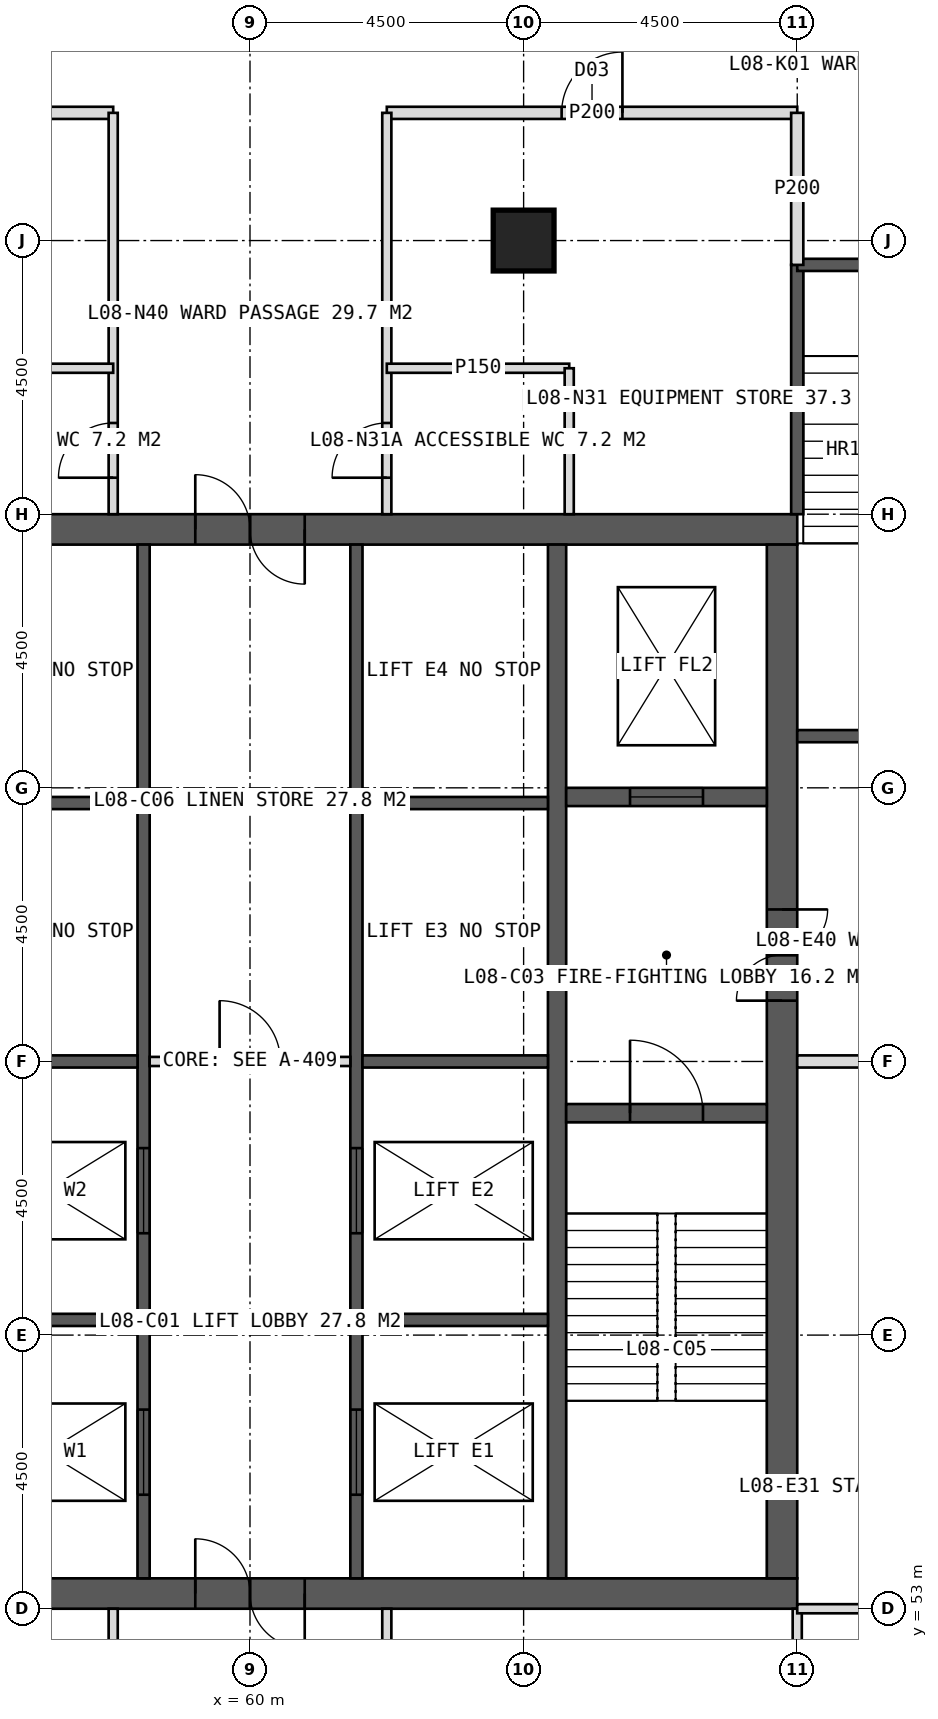
"""IFC4 building model, lengths in metres.
Left out: names, types, materials, properties, quantities, classifications, styles, units other than length and angle.
Written with IfcOpenShell. Run it as: python <this file> out.ifc"""

import sys

from ifc_helpers import new_model, si_unit, direction, frame, frame_2d, origin, origin_2d, place, context, subcontext, project, spatial, rectangle, hollow_rectangle, extrude, element, fill, save


model = new_model("IFC4")
c1 = context("Model", 3, precision=1e-05, world=origin(), true_north=direction((0.0, 1.0)))
c2 = subcontext(c1, "Body", "Model", "MODEL_VIEW")
j1 = project(units=[si_unit("LENGTHUNIT", "METRE"), si_unit("PLANEANGLEUNIT", "RADIAN")], contexts=[c1])
p1 = place(None, origin())
s1 = spatial("IfcSite", under=j1, at=p1, CompositionType="ELEMENT")
p2 = place(p1, origin())
s2 = spatial("IfcBuilding", under=s1, at=p2, CompositionType="ELEMENT")
p3 = place(p2, frame((0.0, 0.0, 39.0)))
s3 = spatial("IfcBuildingStorey", under=s2, at=p3, CompositionType="ELEMENT", Elevation=39.0)
p4 = place(p3, frame((51.0, 70.75, 0.0), z_axis=(0.0, 0.0, 1.0), x_axis=(1.0, 0.0, 0.0)))
e1 = element("IfcWall", 1, at=p4, inside=s3, PredefinedType="SHEAR", context=c2, shape_type="SweptSolid", body=[
    extrude(rectangle(XDim=18.0, YDim=0.5, at=frame_2d((9.0, 0.0))), origin(), (0.0, 0.0, 1.0), 4.0),
])
p5 = place(p4, frame((8.1, 0.0, 0.0)))
e2 = element("IfcOpeningElement", 2, at=p5, cuts=e1, PredefinedType="OPENING", context=c2, shape_type="SweptSolid", body=[
    extrude(rectangle(XDim=1.8, YDim=2.2, at=frame_2d((0.9, 1.1))), frame((0.0, 0.26, 0.0), z_axis=(0.0, -1.0, 0.0), x_axis=(1.0, 0.0, 0.0)), (0.0, 0.0, 1.0), 0.52),
])
p6 = place(p3, frame((51.0, 53.25, 0.0), z_axis=(0.0, 0.0, 1.0), x_axis=(1.0, 0.0, 0.0)))
e3 = element("IfcWall", 3, at=p6, inside=s3, PredefinedType="SHEAR", context=c2, shape_type="SweptSolid", body=[
    extrude(rectangle(XDim=18.0, YDim=0.5, at=frame_2d((9.0, 0.0))), origin(), (0.0, 0.0, 1.0), 4.0),
])
p7 = place(p6, frame((8.1, 0.0, 0.0)))
e4 = element("IfcOpeningElement", 4, at=p7, cuts=e3, PredefinedType="OPENING", context=c2, shape_type="SweptSolid", body=[
    extrude(rectangle(XDim=1.8, YDim=2.2, at=frame_2d((0.9, 1.1))), frame((0.0, 0.26, 0.0), z_axis=(0.0, -1.0, 0.0), x_axis=(1.0, 0.0, 0.0)), (0.0, 0.0, 1.0), 0.52),
])
p8 = place(p3, frame((68.75, 53.5, 0.0), z_axis=(0.0, 0.0, 1.0), x_axis=(0.0, 1.0, 0.0)))
e5 = element("IfcWall", 5, at=p8, inside=s3, PredefinedType="SHEAR", context=c2, shape_type="SweptSolid", body=[
    extrude(rectangle(XDim=17.0, YDim=0.5, at=frame_2d((8.5, 0.0))), origin(), (0.0, 0.0, 1.0), 4.0),
])
p9 = place(p8, frame((9.5, 0.0, 0.0)))
e6 = element("IfcOpeningElement", 6, at=p9, cuts=e5, PredefinedType="OPENING", context=c2, shape_type="SweptSolid", body=[
    extrude(rectangle(XDim=1.5, YDim=2.2, at=frame_2d((0.75, 1.1))), frame((0.0, 0.26, 0.0), z_axis=(0.0, -1.0, 0.0), x_axis=(1.0, 0.0, 0.0)), (0.0, 0.0, 1.0), 0.52),
])
p10 = place(p3, frame((65.05, 53.5, 0.0), z_axis=(0.0, 0.0, 1.0), x_axis=(0.0, 1.0, 0.0)))
e7 = element("IfcWall", 7, at=p10, inside=s3, PredefinedType="SHEAR", context=c2, shape_type="SweptSolid", body=[
    extrude(rectangle(XDim=17.0, YDim=0.3, at=frame_2d((8.5, 0.0))), origin(), (0.0, 0.0, 1.0), 4.0),
])
p11 = place(p3, frame((58.25, 53.5, 0.0), z_axis=(0.0, 0.0, 1.0), x_axis=(0.0, 1.0, 0.0)))
e8 = element("IfcWall", 8, at=p11, inside=s3, PredefinedType="SHEAR", context=c2, shape_type="SweptSolid", body=[
    extrude(rectangle(XDim=17.0, YDim=0.2, at=frame_2d((8.5, 0.0))), origin(), (0.0, 0.0, 1.0), 4.0),
])
p12 = place(p11, frame((1.375, 0.0, 0.0)))
e9 = element("IfcOpeningElement", 9, at=p12, cuts=e8, PredefinedType="OPENING", context=c2, shape_type="SweptSolid", body=[
    extrude(rectangle(XDim=1.4, YDim=2.2, at=frame_2d((0.7, 1.1))), frame((0.0, 0.11, 0.0), z_axis=(0.0, -1.0, 0.0), x_axis=(1.0, 0.0, 0.0)), (0.0, 0.0, 1.0), 0.22),
])
p13 = place(p11, frame((5.675, 0.0, 0.0)))
e10 = element("IfcOpeningElement", 10, at=p13, cuts=e8, PredefinedType="OPENING", context=c2, shape_type="SweptSolid", body=[
    extrude(rectangle(XDim=1.4, YDim=2.2, at=frame_2d((0.7, 1.1))), frame((0.0, 0.11, 0.0), z_axis=(0.0, -1.0, 0.0), x_axis=(1.0, 0.0, 0.0)), (0.0, 0.0, 1.0), 0.22),
])
p14 = place(p3, frame((61.75, 53.5, 0.0), z_axis=(0.0, 0.0, 1.0), x_axis=(0.0, 1.0, 0.0)))
e11 = element("IfcWall", 11, at=p14, inside=s3, PredefinedType="SHEAR", context=c2, shape_type="SweptSolid", body=[
    extrude(rectangle(XDim=17.0, YDim=0.2, at=frame_2d((8.5, 0.0))), origin(), (0.0, 0.0, 1.0), 4.0),
])
p15 = place(p14, frame((1.375, 0.0, 0.0)))
e12 = element("IfcOpeningElement", 12, at=p15, cuts=e11, PredefinedType="OPENING", context=c2, shape_type="SweptSolid", body=[
    extrude(rectangle(XDim=1.4, YDim=2.2, at=frame_2d((0.7, 1.1))), frame((0.0, 0.11, 0.0), z_axis=(0.0, -1.0, 0.0), x_axis=(1.0, 0.0, 0.0)), (0.0, 0.0, 1.0), 0.22),
])
p16 = place(p14, frame((5.675, 0.0, 0.0)))
e13 = element("IfcOpeningElement", 13, at=p16, cuts=e11, PredefinedType="OPENING", context=c2, shape_type="SweptSolid", body=[
    extrude(rectangle(XDim=1.4, YDim=2.2, at=frame_2d((0.7, 1.1))), frame((0.0, 0.11, 0.0), z_axis=(0.0, -1.0, 0.0), x_axis=(1.0, 0.0, 0.0)), (0.0, 0.0, 1.0), 0.22),
])
for number, where, z_axis, x_axis in (
    (14, (55.1, 57.75, 0.0), (0.0, 0.0, 1.0), (1.0, 0.0, 0.0)),
    (15, (61.85, 57.75, 0.0), (0.0, 0.0, 1.0), (1.0, 0.0, 0.0)),
    (16, (55.1, 62.0, 0.0), (0.0, 0.0, 1.0), (1.0, 0.0, 0.0)),
    (17, (61.85, 62.0, 0.0), (0.0, 0.0, 1.0), (1.0, 0.0, 0.0)),
    (18, (55.1, 66.25, 0.0), (0.0, 0.0, 1.0), (1.0, 0.0, 0.0)),
    (19, (61.85, 66.25, 0.0), (0.0, 0.0, 1.0), (1.0, 0.0, 0.0)),
):
    element("IfcWall", number, at=place(p3, frame(where, z_axis=z_axis, x_axis=x_axis)), inside=s3, PredefinedType="SHEAR", context=c2, shape_type="SweptSolid", body=[
        extrude(rectangle(XDim=3.05, YDim=0.2, at=frame_2d((1.525, 0.0))), origin(), (0.0, 0.0, 1.0), 4.0),
    ])
p17 = place(p3, frame((65.2, 61.15, 0.0), z_axis=(0.0, 0.0, 1.0), x_axis=(1.0, 0.0, 0.0)))
e20 = element("IfcWall", 20, at=p17, inside=s3, PredefinedType="SHEAR", context=c2, shape_type="SweptSolid", body=[
    extrude(rectangle(XDim=3.3, YDim=0.3, at=frame_2d((1.65, 0.0))), origin(), (0.0, 0.0, 1.0), 4.0),
])
p18 = place(p17, frame((1.05, 0.0, 0.0)))
e21 = element("IfcOpeningElement", 21, at=p18, cuts=e20, PredefinedType="OPENING", context=c2, shape_type="SweptSolid", body=[
    extrude(rectangle(XDim=1.2, YDim=2.1, at=frame_2d((0.6, 1.05))), frame((0.0, 0.16, 0.0), z_axis=(0.0, -1.0, 0.0), x_axis=(1.0, 0.0, 0.0)), (0.0, 0.0, 1.0), 0.32),
])
p19 = place(p3, frame((65.2, 66.35, 0.0), z_axis=(0.0, 0.0, 1.0), x_axis=(1.0, 0.0, 0.0)))
e22 = element("IfcWall", 22, at=p19, inside=s3, PredefinedType="SHEAR", context=c2, shape_type="SweptSolid", body=[
    extrude(rectangle(XDim=3.3, YDim=0.3, at=frame_2d((1.65, 0.0))), origin(), (0.0, 0.0, 1.0), 4.0),
])
p20 = place(p19, frame((1.05, 0.0, 0.0)))
e23 = element("IfcOpeningElement", 23, at=p20, cuts=e22, PredefinedType="OPENING", context=c2, shape_type="SweptSolid", body=[
    extrude(rectangle(XDim=1.2, YDim=2.2, at=frame_2d((0.6, 1.1))), frame((0.0, 0.16, 0.0), z_axis=(0.0, -1.0, 0.0), x_axis=(1.0, 0.0, 0.0)), (0.0, 0.0, 1.0), 0.32),
])
p21 = place(p3, frame((64.5, 75.5, 0.0), z_axis=(0.0, 0.0, 1.0), x_axis=(1.0, 0.0, 0.0)))
e24 = element("IfcColumn", 24, at=p21, inside=s3, PredefinedType="COLUMN", context=c2, shape_type="SweptSolid", body=[
    extrude(hollow_rectangle(XDim=1.0, YDim=1.0, WallThickness=0.1, at=origin_2d()), origin(), (0.0, 0.0, 1.0), 4.0),
])
p22 = place(p3, frame((44.4, 77.6, 0.0), z_axis=(0.0, 0.0, 1.0), x_axis=(1.0, 0.0, 0.0)))
e25 = element("IfcWall", 25, at=p22, inside=s3, PredefinedType="PARTITIONING", context=c2, shape_type="SweptSolid", body=[
    extrude(rectangle(XDim=13.35, YDim=0.2, at=frame_2d((6.675, 0.0))), origin(), (0.0, 0.0, 1.0), 3.75),
])
p23 = place(p22, frame((9.475, 0.0, 0.0)))
e26 = element("IfcOpeningElement", 26, at=p23, cuts=e25, PredefinedType="OPENING", context=c2, shape_type="SweptSolid", body=[
    extrude(rectangle(XDim=1.0, YDim=2.1, at=frame_2d((0.5, 1.05))), frame((0.0, 0.11, 0.0), z_axis=(0.0, -1.0, 0.0), x_axis=(1.0, 0.0, 0.0)), (0.0, 0.0, 1.0), 0.22),
])
p24 = place(p3, frame((62.25, 77.6, 0.0), z_axis=(0.0, 0.0, 1.0), x_axis=(1.0, 0.0, 0.0)))
e27 = element("IfcWall", 27, at=p24, inside=s3, PredefinedType="PARTITIONING", context=c2, shape_type="SweptSolid", body=[
    extrude(rectangle(XDim=6.75, YDim=0.2, at=frame_2d((3.375, 0.0))), origin(), (0.0, 0.0, 1.0), 3.75),
])
p25 = place(p24, frame((2.875, 0.0, 0.0)))
e28 = element("IfcOpeningElement", 28, at=p25, cuts=e27, PredefinedType="OPENING", context=c2, shape_type="SweptSolid", body=[
    extrude(rectangle(XDim=1.0, YDim=2.1, at=frame_2d((0.5, 1.05))), frame((0.0, 0.11, 0.0), z_axis=(0.0, -1.0, 0.0), x_axis=(1.0, 0.0, 0.0)), (0.0, 0.0, 1.0), 0.22),
])
p26 = place(p3, frame((57.75, 71.0, 0.0), z_axis=(0.0, 0.0, 1.0), x_axis=(0.0, 1.0, 0.0)))
e29 = element("IfcWall", 29, at=p26, inside=s3, PredefinedType="PARTITIONING", context=c2, shape_type="SweptSolid", body=[
    extrude(rectangle(XDim=6.6, YDim=0.15, at=frame_2d((3.3, 0.0))), origin(), (0.0, 0.0, 1.0), 3.75),
])
p27 = place(p26, frame((0.6, 0.0, 0.0)))
e30 = element("IfcOpeningElement", 30, at=p27, cuts=e29, PredefinedType="OPENING", context=c2, shape_type="SweptSolid", body=[
    extrude(rectangle(XDim=0.9, YDim=2.1, at=frame_2d((0.45, 1.05))), frame((0.0, 0.085, 0.0), z_axis=(0.0, -1.0, 0.0), x_axis=(1.0, 0.0, 0.0)), (0.0, 0.0, 1.0), 0.17),
])
p28 = place(p3, frame((62.25, 71.0, 0.0), z_axis=(0.0, 0.0, 1.0), x_axis=(0.0, 1.0, 0.0)))
e31 = element("IfcWall", 31, at=p28, inside=s3, PredefinedType="PARTITIONING", context=c2, shape_type="SweptSolid", body=[
    extrude(rectangle(XDim=6.6, YDim=0.15, at=frame_2d((3.3, 0.0))), origin(), (0.0, 0.0, 1.0), 3.75),
])
p29 = place(p28, frame((0.6, 0.0, 0.0)))
e32 = element("IfcOpeningElement", 32, at=p29, cuts=e31, PredefinedType="OPENING", context=c2, shape_type="SweptSolid", body=[
    extrude(rectangle(XDim=0.9, YDim=2.1, at=frame_2d((0.45, 1.05))), frame((0.0, 0.085, 0.0), z_axis=(0.0, -1.0, 0.0), x_axis=(1.0, 0.0, 0.0)), (0.0, 0.0, 1.0), 0.17),
])
for number, where, z_axis, x_axis in (
    (33, (54.75, 73.4, 0.0), (0.0, 0.0, 1.0), (1.0, 0.0, 0.0)),
    (34, (62.25, 73.4, 0.0), (0.0, 0.0, 1.0), (1.0, 0.0, 0.0)),
):
    element("IfcWall", number, at=place(p3, frame(where, z_axis=z_axis, x_axis=x_axis)), inside=s3, PredefinedType="PARTITIONING", context=c2, shape_type="SweptSolid", body=[
        extrude(rectangle(XDim=3.0, YDim=0.15, at=frame_2d((1.5, 0.0))), origin(), (0.0, 0.0, 1.0), 3.75),
    ])
p30 = place(p3, frame((65.25, 71.0, 0.0), z_axis=(0.0, 0.0, 1.0), x_axis=(0.0, 1.0, 0.0)))
e35 = element("IfcWall", 35, at=p30, inside=s3, PredefinedType="PARTITIONING", context=c2, shape_type="SweptSolid", body=[
    extrude(rectangle(XDim=2.4, YDim=0.15, at=frame_2d((1.2, 0.0))), origin(), (0.0, 0.0, 1.0), 3.75),
])
for number, where, z_axis, x_axis in (
    (36, (69.0, 53.0, 0.0), (0.0, 0.0, 1.0), (0.0, -1.0, 0.0)),
    (37, (62.25, 53.0, 0.0), (0.0, 0.0, 1.0), (0.0, -1.0, 0.0)),
    (38, (57.75, 53.0, 0.0), (0.0, 0.0, 1.0), (0.0, -1.0, 0.0)),
):
    element("IfcWall", number, at=place(p3, frame(where, z_axis=z_axis, x_axis=x_axis)), inside=s3, PredefinedType="PARTITIONING", context=c2, shape_type="SweptSolid", body=[
        extrude(rectangle(XDim=6.6, YDim=0.15, at=frame_2d((3.3, 0.0))), origin(), (0.0, 0.0, 1.0), 3.75),
    ])
p31 = place(p3, frame((69.0, 62.0, 0.0), z_axis=(0.0, 0.0, 1.0), x_axis=(1.0, 0.0, 0.0)))
e39 = element("IfcWall", 39, at=p31, inside=s3, PredefinedType="SOLIDWALL", context=c2, shape_type="SweptSolid", body=[
    extrude(rectangle(XDim=6.6, YDim=0.2, at=frame_2d((3.3, 0.0))), origin(), (0.0, 0.0, 1.0), 2.75),
])
p32 = place(p3, frame((69.0, 53.0, 0.0), z_axis=(0.0, 0.0, 1.0), x_axis=(1.0, 0.0, 0.0)))
e40 = element("IfcWall", 40, at=p32, inside=s3, PredefinedType="PARTITIONING", context=c2, shape_type="SweptSolid", body=[
    extrude(rectangle(XDim=6.6, YDim=0.15, at=frame_2d((3.3, 0.0))), origin(), (0.0, 0.0, 1.0), 3.75),
])
p33 = place(p3, frame((58.35, 62.0, 0.0), z_axis=(0.0, 0.0, 1.0), x_axis=(1.0, 0.0, 0.0)))
e41 = element("IfcWall", 41, at=p33, inside=s3, PredefinedType="PARTITIONING", context=c2, shape_type="SweptSolid", body=[
    extrude(rectangle(XDim=3.3, YDim=0.15, at=frame_2d((1.65, 0.0))), origin(), (0.0, 0.0, 1.0), 3.75),
])
p34 = place(p33, frame((1.15, 0.0, 0.0)))
e42 = element("IfcOpeningElement", 42, at=p34, cuts=e41, PredefinedType="OPENING", context=c2, shape_type="SweptSolid", body=[
    extrude(rectangle(XDim=1.0, YDim=2.1, at=frame_2d((0.5, 1.05))), frame((0.0, 0.085, 0.0), z_axis=(0.0, -1.0, 0.0), x_axis=(1.0, 0.0, 0.0)), (0.0, 0.0, 1.0), 0.17),
])
p35 = place(p3, frame((69.0, 71.0, 0.0), z_axis=(0.0, 0.0, 1.0), x_axis=(0.0, 1.0, 0.0)))
e43 = element("IfcWall", 43, at=p35, inside=s3, PredefinedType="SOLIDWALL", context=c2, shape_type="SweptSolid", body=[
    extrude(rectangle(XDim=4.1, YDim=0.2, at=frame_2d((2.05, 0.0))), origin(), (0.0, 0.0, 1.0), 3.75),
])
p36 = place(p3, frame((69.0, 67.35, 0.0), z_axis=(0.0, 0.0, 1.0), x_axis=(1.0, 0.0, 0.0)))
e44 = element("IfcWall", 44, at=p36, inside=s3, PredefinedType="SOLIDWALL", context=c2, shape_type="SweptSolid", body=[
    extrude(rectangle(XDim=3.5, YDim=0.2, at=frame_2d((1.75, 0.0))), origin(), (0.0, 0.0, 1.0), 3.75),
])
p37 = place(p3, frame((69.0, 75.1, 0.0), z_axis=(0.0, 0.0, 1.0), x_axis=(1.0, 0.0, 0.0)))
e45 = element("IfcWall", 45, at=p37, inside=s3, PredefinedType="SOLIDWALL", context=c2, shape_type="SweptSolid", body=[
    extrude(rectangle(XDim=3.5, YDim=0.2, at=frame_2d((1.75, 0.0))), origin(), (0.0, 0.0, 1.0), 3.75),
])
p38 = place(p37, frame((1.15, 0.0, 0.0)))
e46 = element("IfcOpeningElement", 46, at=p38, cuts=e45, PredefinedType="OPENING", context=c2, shape_type="SweptSolid", body=[
    extrude(rectangle(XDim=1.2, YDim=2.1, at=frame_2d((0.6, 1.05))), frame((0.0, 0.11, 0.0), z_axis=(0.0, -1.0, 0.0), x_axis=(1.0, 0.0, 0.0)), (0.0, 0.0, 1.0), 0.22),
])
p39 = place(p3, frame((69.0, 75.1, 0.0), z_axis=(0.0, 0.0, 1.0), x_axis=(0.0, 1.0, 0.0)))
e47 = element("IfcWall", 47, at=p39, inside=s3, PredefinedType="PARTITIONING", context=c2, shape_type="SweptSolid", body=[
    extrude(rectangle(XDim=2.5, YDim=0.2, at=frame_2d((1.25, 0.0))), origin(), (0.0, 0.0, 1.0), 3.75),
])
p40 = place(p27, origin())
e48 = element("IfcDoor", 48, at=p40, inside=s3, OperationType="SINGLE_SWING_LEFT", PredefinedType="DOOR", context=c2, shape_type="SweptSolid", body=[
    extrude(rectangle(XDim=0.9, YDim=2.1, at=frame_2d((0.45, 1.05))), frame((0.0, 0.025, 0.0), z_axis=(0.0, -1.0, 0.0), x_axis=(1.0, 0.0, 0.0)), (0.0, 0.0, 1.0), 0.05),
])
fill(e30, e48)
p41 = place(p29, origin())
e49 = element("IfcDoor", 49, at=p41, inside=s3, OperationType="SINGLE_SWING_LEFT", PredefinedType="DOOR", context=c2, shape_type="SweptSolid", body=[
    extrude(rectangle(XDim=0.9, YDim=2.1, at=frame_2d((0.45, 1.05))), frame((0.0, 0.025, 0.0), z_axis=(0.0, -1.0, 0.0), x_axis=(1.0, 0.0, 0.0)), (0.0, 0.0, 1.0), 0.05),
])
fill(e32, e49)
p42 = place(p25, origin())
e50 = element("IfcDoor", 50, at=p42, inside=s3, OperationType="SINGLE_SWING_RIGHT", PredefinedType="DOOR", context=c2, shape_type="SweptSolid", body=[
    extrude(rectangle(XDim=1.0, YDim=2.1, at=frame_2d((0.5, 1.05))), frame((0.0, 0.025, 0.0), z_axis=(0.0, -1.0, 0.0), x_axis=(1.0, 0.0, 0.0)), (0.0, 0.0, 1.0), 0.05),
])
fill(e28, e50)
p43 = place(p7, origin())
e51 = element("IfcDoor", 51, at=p43, inside=s3, OperationType="DOUBLE_DOOR_SINGLE_SWING", PredefinedType="DOOR", context=c2, shape_type="SweptSolid", body=[
    extrude(rectangle(XDim=1.8, YDim=2.2, at=frame_2d((0.9, 1.1))), frame((0.0, 0.025, 0.0), z_axis=(0.0, -1.0, 0.0), x_axis=(1.0, 0.0, 0.0)), (0.0, 0.0, 1.0), 0.05),
])
fill(e4, e51)
p44 = place(p9, origin())
e52 = element("IfcDoor", 52, at=p44, inside=s3, OperationType="DOUBLE_DOOR_SINGLE_SWING", PredefinedType="DOOR", context=c2, shape_type="SweptSolid", body=[
    extrude(rectangle(XDim=1.5, YDim=2.2, at=frame_2d((0.75, 1.1))), frame((0.0, 0.025, 0.0), z_axis=(0.0, -1.0, 0.0), x_axis=(1.0, 0.0, 0.0)), (0.0, 0.0, 1.0), 0.05),
])
fill(e6, e52)
p45 = place(p18, origin())
e53 = element("IfcDoor", 53, at=p45, inside=s3, OperationType="SINGLE_SWING_LEFT", PredefinedType="DOOR", context=c2, shape_type="SweptSolid", body=[
    extrude(rectangle(XDim=1.2, YDim=2.1, at=frame_2d((0.6, 1.05))), frame((0.0, 0.025, 0.0), z_axis=(0.0, -1.0, 0.0), x_axis=(1.0, 0.0, 0.0)), (0.0, 0.0, 1.0), 0.05),
])
fill(e21, e53)
p46 = place(p20, origin())
e54 = element("IfcDoor", 54, at=p46, inside=s3, OperationType="SLIDING_TO_LEFT", PredefinedType="DOOR", context=c2, shape_type="SweptSolid", body=[
    extrude(rectangle(XDim=1.2, YDim=2.2, at=frame_2d((0.6, 1.1))), frame((0.0, 0.025, 0.0), z_axis=(0.0, -1.0, 0.0), x_axis=(1.0, 0.0, 0.0)), (0.0, 0.0, 1.0), 0.05),
])
fill(e23, e54)
p47 = place(p12, origin())
e55 = element("IfcDoor", 55, at=p47, inside=s3, OperationType="SLIDING_TO_LEFT", PredefinedType="DOOR", context=c2, shape_type="SweptSolid", body=[
    extrude(rectangle(XDim=1.4, YDim=2.2, at=frame_2d((0.7, 1.1))), frame((0.0, 0.025, 0.0), z_axis=(0.0, -1.0, 0.0), x_axis=(1.0, 0.0, 0.0)), (0.0, 0.0, 1.0), 0.05),
])
fill(e9, e55)
p48 = place(p15, origin())
e56 = element("IfcDoor", 56, at=p48, inside=s3, OperationType="SLIDING_TO_LEFT", PredefinedType="DOOR", context=c2, shape_type="SweptSolid", body=[
    extrude(rectangle(XDim=1.4, YDim=2.2, at=frame_2d((0.7, 1.1))), frame((0.0, 0.025, 0.0), z_axis=(0.0, -1.0, 0.0), x_axis=(1.0, 0.0, 0.0)), (0.0, 0.0, 1.0), 0.05),
])
fill(e12, e56)
p49 = place(p13, origin())
e57 = element("IfcDoor", 57, at=p49, inside=s3, OperationType="SLIDING_TO_LEFT", PredefinedType="DOOR", context=c2, shape_type="SweptSolid", body=[
    extrude(rectangle(XDim=1.4, YDim=2.2, at=frame_2d((0.7, 1.1))), frame((0.0, 0.025, 0.0), z_axis=(0.0, -1.0, 0.0), x_axis=(1.0, 0.0, 0.0)), (0.0, 0.0, 1.0), 0.05),
])
fill(e10, e57)
p50 = place(p16, origin())
e58 = element("IfcDoor", 58, at=p50, inside=s3, OperationType="SLIDING_TO_LEFT", PredefinedType="DOOR", context=c2, shape_type="SweptSolid", body=[
    extrude(rectangle(XDim=1.4, YDim=2.2, at=frame_2d((0.7, 1.1))), frame((0.0, 0.025, 0.0), z_axis=(0.0, -1.0, 0.0), x_axis=(1.0, 0.0, 0.0)), (0.0, 0.0, 1.0), 0.05),
])
fill(e13, e58)
p51 = place(p34, origin())
e59 = element("IfcDoor", 59, at=p51, inside=s3, OperationType="SINGLE_SWING_LEFT", PredefinedType="DOOR", context=c2, shape_type="SweptSolid", body=[
    extrude(rectangle(XDim=1.0, YDim=2.1, at=frame_2d((0.5, 1.05))), frame((0.0, 0.025, 0.0), z_axis=(0.0, -1.0, 0.0), x_axis=(1.0, 0.0, 0.0)), (0.0, 0.0, 1.0), 0.05),
])
fill(e42, e59)
p52 = place(p5, origin())
e60 = element("IfcDoor", 60, at=p52, inside=s3, OperationType="DOUBLE_DOOR_SINGLE_SWING", PredefinedType="DOOR", context=c2, shape_type="SweptSolid", body=[
    extrude(rectangle(XDim=1.8, YDim=2.2, at=frame_2d((0.9, 1.1))), frame((0.0, 0.025, 0.0), z_axis=(0.0, -1.0, 0.0), x_axis=(1.0, 0.0, 0.0)), (0.0, 0.0, 1.0), 0.05),
])
fill(e2, e60)
save(model, sys.argv[1])
